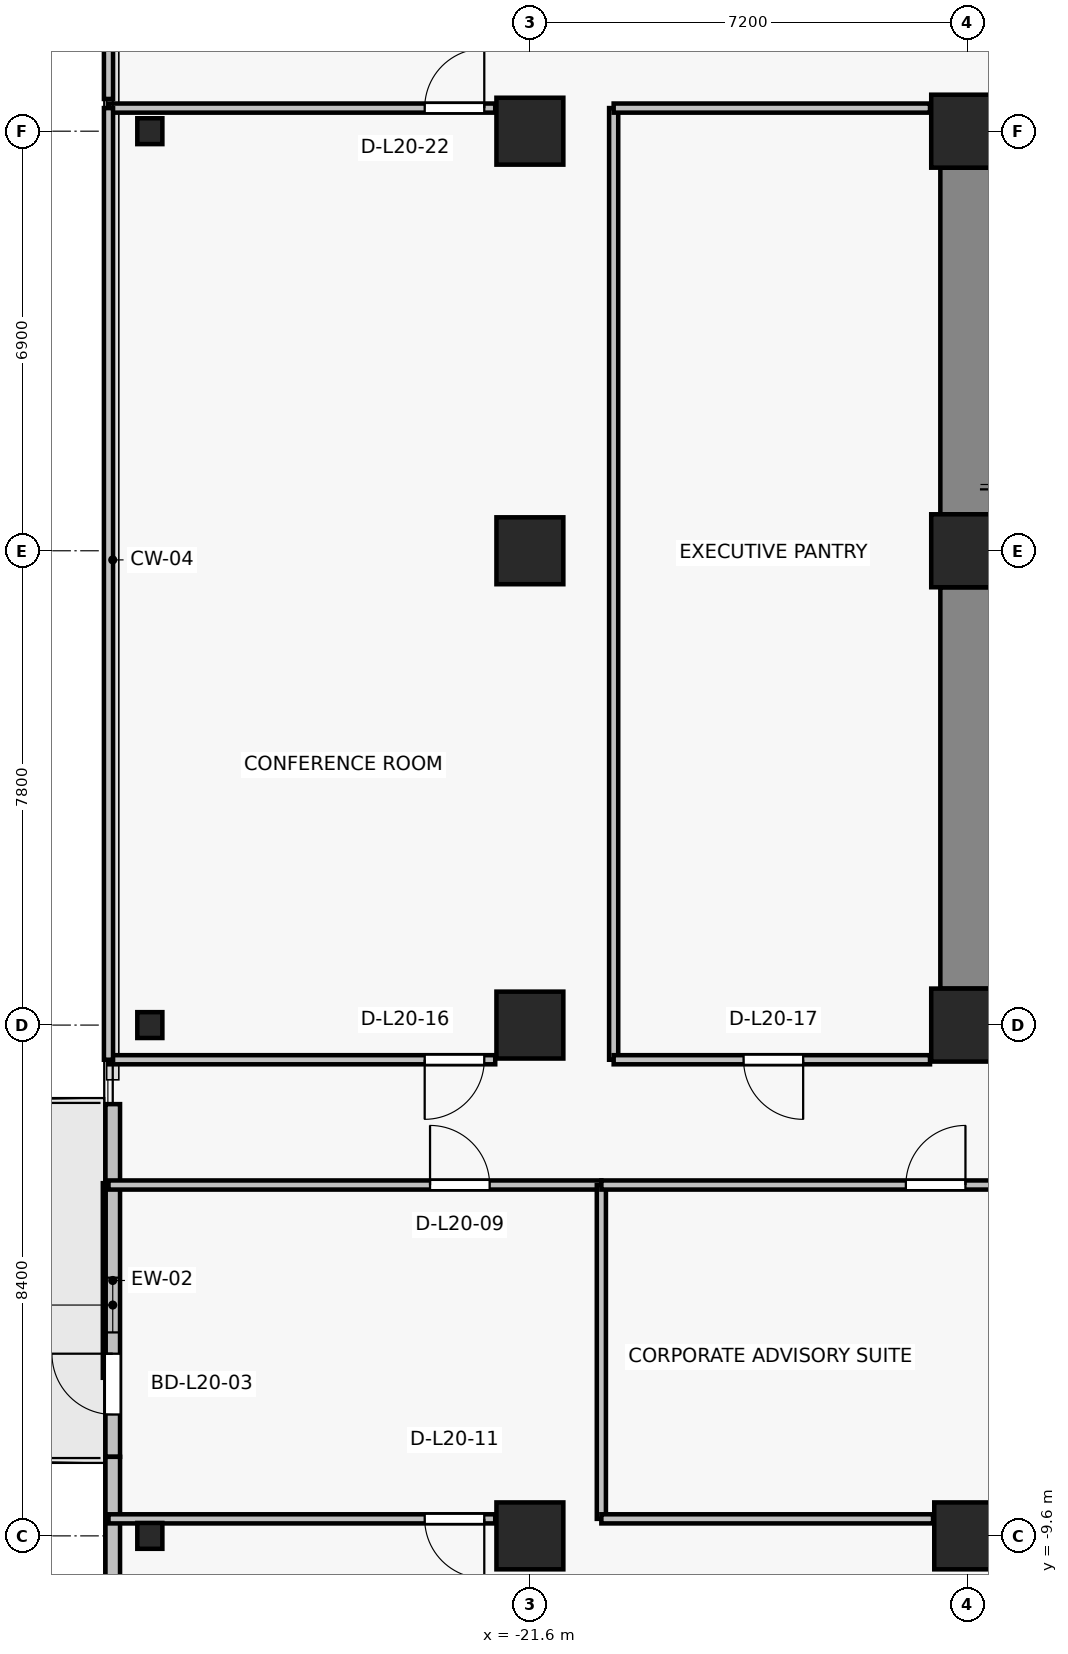
"""IFC4 building model, lengths in metres.
Left out: names, types, materials, properties, quantities, classifications, styles, units other than length and angle.
Written with IfcOpenShell. Run it as: python <this file> out.ifc"""

import sys

from ifc_helpers import new_model, si_unit, direction, frame, frame_2d, origin, origin_2d, place, context, subcontext, project, spatial, rectangle, i_section, extrude, source, transform, mapped, element, fill, save


model = new_model("IFC4")
c1 = context("Model", 3, precision=1e-05, world=origin(), true_north=direction((0.0, 1.0)))
c2 = subcontext(c1, "Body", "Model", "MODEL_VIEW")
j1 = project(units=[si_unit("LENGTHUNIT", "METRE"), si_unit("PLANEANGLEUNIT", "RADIAN")], contexts=[c1])
p1 = place(None, origin())
s1 = spatial("IfcSite", under=j1, at=p1, CompositionType="ELEMENT")
p2 = place(p1, origin())
s2 = spatial("IfcBuilding", under=s1, at=p2, CompositionType="ELEMENT")
p3 = place(p2, frame((0.0, 0.0, 73.6)))
s3 = spatial("IfcBuildingStorey", under=s2, at=p3, CompositionType="ELEMENT", Elevation=73.6)
for number, where, z_axis, x_axis in (
    (1, (-14.4, -1.2, 0.0), (0.0, 0.0, 1.0), (1.0, 0.0, 0.0)),
    (2, (-14.4, 6.6, 0.0), (0.0, 0.0, 1.0), (1.0, 0.0, 0.0)),
    (3, (-14.4, 13.5, 0.0), (0.0, 0.0, 1.0), (1.0, 0.0, 0.0)),
):
    element("IfcColumn", number, at=place(p3, frame(where, z_axis=z_axis, x_axis=x_axis)), inside=s3, PredefinedType="COLUMN", context=c2, shape_type="SweptSolid", body=[
        extrude(rectangle(XDim=1.2, YDim=1.2, at=origin_2d()), origin(), (0.0, 0.0, 1.0), 3.3),
    ])
for number, where, z_axis, x_axis in (
    (4, (-14.4, -9.6, 0.0), (0.0, 0.0, 1.0), (1.0, 0.0, 0.0)),
    (5, (-21.6, -9.6, 0.0), (0.0, 0.0, 1.0), (1.0, 0.0, 0.0)),
    (6, (-21.6, -1.2, 0.0), (0.0, 0.0, 1.0), (1.0, 0.0, 0.0)),
    (7, (-21.6, 6.6, 0.0), (0.0, 0.0, 1.0), (1.0, 0.0, 0.0)),
    (8, (-21.6, 13.5, 0.0), (0.0, 0.0, 1.0), (1.0, 0.0, 0.0)),
):
    element("IfcColumn", number, at=place(p3, frame(where, z_axis=z_axis, x_axis=x_axis)), inside=s3, PredefinedType="COLUMN", context=c2, shape_type="SweptSolid", body=[
        extrude(rectangle(XDim=1.1, YDim=1.1, at=origin_2d()), origin(), (0.0, 0.0, 1.0), 3.3),
    ])
for number, where, z_axis, x_axis in (
    (9, (-27.85, -9.6, 0.0), (0.0, 0.0, 1.0), (1.0, 0.0, 0.0)),
    (10, (-27.85, -1.2, 0.0), (0.0, 0.0, 1.0), (1.0, 0.0, 0.0)),
    (11, (-27.85, 13.5, 0.0), (0.0, 0.0, 1.0), (1.0, 0.0, 0.0)),
):
    element("IfcColumn", number, at=place(p3, frame(where, z_axis=z_axis, x_axis=x_axis)), inside=s3, PredefinedType="COLUMN", context=c2, shape_type="SweptSolid", body=[
        extrude(i_section(OverallWidth=0.412, OverallDepth=0.425, WebThickness=0.026, FlangeThickness=0.039, FilletRadius=0.015, at=origin_2d()), origin(), (0.0, 0.0, 1.0), 3.3),
    ])
p4 = place(p3, frame((-14.4, -0.6, 0.0), z_axis=(0.0, 0.0, 1.0), x_axis=(0.0, 1.0, 0.0)))
e12 = element("IfcWall", 12, at=p4, inside=s3, PredefinedType="SHEAR", context=c2, shape_type="SweptSolid", body=[
    extrude(rectangle(XDim=6.6, YDim=0.9, at=frame_2d((3.3, 0.0))), origin(), (0.0, 0.0, 1.0), 3.075),
])
p5 = place(p3, frame((-14.4, 7.2, 0.0), z_axis=(0.0, 0.0, 1.0), x_axis=(0.0, 1.0, 0.0)))
e13 = element("IfcWall", 13, at=p5, inside=s3, PredefinedType="SHEAR", context=c2, shape_type="SweptSolid", body=[
    extrude(rectangle(XDim=5.7, YDim=0.9, at=frame_2d((2.85, 0.0))), origin(), (0.0, 0.0, 1.0), 3.075),
])
p6 = place(p3, frame((-28.46, -8.3, 0.0), z_axis=(0.0, 0.0, 1.0), x_axis=(0.0, 1.0, 0.0)))
e14 = element("IfcWall", 14, at=p6, inside=s3, PredefinedType="SOLIDWALL", context=c2, shape_type="SweptSolid", body=[
    extrude(rectangle(XDim=5.8, YDim=0.24, at=frame_2d((2.9, 0.0))), origin(), (0.0, 0.0, 1.0), 3.075),
])
p7 = place(p6, frame((0.696, 0.0, 0.0)))
e15 = element("IfcOpeningElement", 15, at=p7, cuts=e14, PredefinedType="OPENING", context=c2, shape_type="SweptSolid", body=[
    extrude(rectangle(XDim=1.0, YDim=2.2, at=frame_2d((0.5, 1.1))), frame((0.0, 0.13, 0.0), z_axis=(0.0, -1.0, 0.0), x_axis=(1.0, 0.0, 0.0)), (0.0, 0.0, 1.0), 0.26),
])
p8 = place(p6, frame((2.046, 0.0, 0.85)))
e16 = element("IfcOpeningElement", 16, at=p8, cuts=e14, PredefinedType="OPENING", context=c2, shape_type="SweptSolid", body=[
    extrude(rectangle(XDim=0.9, YDim=1.35, at=frame_2d((0.45, 0.675))), frame((0.0, 0.13, 0.0), z_axis=(0.0, -1.0, 0.0), x_axis=(1.0, 0.0, 0.0)), (0.0, 0.0, 1.0), 0.26),
])
p9 = place(p3, frame((-28.46, -8.3, 0.0), z_axis=(0.0, 0.0, 1.0), x_axis=(0.0, -1.0, 0.0)))
e17 = element("IfcWall", 17, at=p9, inside=s3, PredefinedType="SOLIDWALL", context=c2, shape_type="SweptSolid", body=[
    extrude(rectangle(XDim=6.76, YDim=0.24, at=frame_2d((3.38, 0.0))), origin(), (0.0, 0.0, 1.0), 3.075),
])
p10 = place(p3, frame((-22.17, -9.32, 0.0), z_axis=(0.0, 0.0, 1.0), x_axis=(-1.0, 0.0, 0.0)))
e18 = element("IfcWall", 18, at=p10, inside=s3, PredefinedType="PARTITIONING", context=c2, shape_type="SweptSolid", body=[
    extrude(rectangle(XDim=6.36, YDim=0.15, at=frame_2d((3.18, 0.0))), origin(), (0.0, 0.0, 1.0), 2.465),
])
p11 = place(p10, frame((0.18, 0.0, 0.0)))
e19 = element("IfcOpeningElement", 19, at=p11, cuts=e18, PredefinedType="OPENING", context=c2, shape_type="SweptSolid", body=[
    extrude(rectangle(XDim=0.98, YDim=2.15, at=frame_2d((0.49, 1.075))), frame((0.0, 0.085, 0.0), z_axis=(0.0, -1.0, 0.0), x_axis=(1.0, 0.0, 0.0)), (0.0, 0.0, 1.0), 0.17),
])
p12 = place(p3, frame((-28.53, -3.83, 0.0), z_axis=(0.0, 0.0, 1.0), x_axis=(1.0, 0.0, 0.0)))
e20 = element("IfcWall", 20, at=p12, inside=s3, PredefinedType="PARTITIONING", context=c2, shape_type="SweptSolid", body=[
    extrude(rectangle(XDim=8.105, YDim=0.15, at=frame_2d((4.053, 0.0))), origin(), (0.0, 0.0, 1.0), 2.465),
])
p13 = place(p12, frame((5.288, 0.0, 0.0)))
e21 = element("IfcOpeningElement", 21, at=p13, cuts=e20, PredefinedType="OPENING", context=c2, shape_type="SweptSolid", body=[
    extrude(rectangle(XDim=0.98, YDim=2.15, at=frame_2d((0.49, 1.075))), frame((0.0, 0.085, 0.0), z_axis=(0.0, -1.0, 0.0), x_axis=(1.0, 0.0, 0.0)), (0.0, 0.0, 1.0), 0.17),
])
p14 = place(p3, frame((-20.425, -3.83, 0.0), z_axis=(0.0, 0.0, 1.0), x_axis=(0.0, -1.0, 0.0)))
e22 = element("IfcWall", 22, at=p14, inside=s3, PredefinedType="PARTITIONING", context=c2, shape_type="SweptSolid", body=[
    extrude(rectangle(XDim=5.49, YDim=0.15, at=frame_2d((2.745, 0.0))), origin(), (0.0, 0.0, 1.0), 2.465),
])
p15 = place(p3, frame((-14.97, -9.32, 0.0), z_axis=(0.0, 0.0, 1.0), x_axis=(-1.0, 0.0, 0.0)))
e23 = element("IfcWall", 23, at=p15, inside=s3, PredefinedType="PARTITIONING", context=c2, shape_type="SweptSolid", body=[
    extrude(rectangle(XDim=5.455, YDim=0.15, at=frame_2d((2.727, 0.0))), origin(), (0.0, 0.0, 1.0), 2.465),
])
p16 = place(p3, frame((-20.425, -3.83, 0.0), z_axis=(0.0, 0.0, 1.0), x_axis=(1.0, 0.0, 0.0)))
e24 = element("IfcWall", 24, at=p16, inside=s3, PredefinedType="PARTITIONING", context=c2, shape_type="SweptSolid", body=[
    extrude(rectangle(XDim=10.995, YDim=0.15, at=frame_2d((5.497, 0.0))), origin(), (0.0, 0.0, 1.0), 2.465),
])
p17 = place(p16, frame((5.008, 0.0, 0.0)))
e25 = element("IfcOpeningElement", 25, at=p17, cuts=e24, PredefinedType="OPENING", context=c2, shape_type="SweptSolid", body=[
    extrude(rectangle(XDim=0.98, YDim=2.15, at=frame_2d((0.49, 1.075))), frame((0.0, 0.085, 0.0), z_axis=(0.0, -1.0, 0.0), x_axis=(1.0, 0.0, 0.0)), (0.0, 0.0, 1.0), 0.17),
])
p18 = place(p3, frame((-22.17, -1.77, 0.0), z_axis=(0.0, 0.0, 1.0), x_axis=(-1.0, 0.0, 0.0)))
e26 = element("IfcWall", 26, at=p18, inside=s3, PredefinedType="PARTITIONING", context=c2, shape_type="SweptSolid", body=[
    extrude(rectangle(XDim=6.36, YDim=0.15, at=frame_2d((3.18, 0.0))), origin(), (0.0, 0.0, 1.0), 2.465),
])
p19 = place(p18, frame((0.18, 0.0, 0.0)))
e27 = element("IfcOpeningElement", 27, at=p19, cuts=e26, PredefinedType="OPENING", context=c2, shape_type="SweptSolid", body=[
    extrude(rectangle(XDim=0.98, YDim=2.15, at=frame_2d((0.49, 1.075))), frame((0.0, 0.085, 0.0), z_axis=(0.0, -1.0, 0.0), x_axis=(1.0, 0.0, 0.0)), (0.0, 0.0, 1.0), 0.17),
])
p20 = place(p3, frame((-28.53, 13.88, 0.0), z_axis=(0.0, 0.0, 1.0), x_axis=(1.0, 0.0, 0.0)))
e28 = element("IfcWall", 28, at=p20, inside=s3, PredefinedType="PARTITIONING", context=c2, shape_type="SweptSolid", body=[
    extrude(rectangle(XDim=6.36, YDim=0.15, at=frame_2d((3.18, 0.0))), origin(), (0.0, 0.0, 1.0), 3.075),
])
p21 = place(p20, frame((5.2, 0.0, 0.0)))
e29 = element("IfcOpeningElement", 29, at=p21, cuts=e28, PredefinedType="OPENING", context=c2, shape_type="SweptSolid", body=[
    extrude(rectangle(XDim=0.98, YDim=2.15, at=frame_2d((0.49, 1.075))), frame((0.0, 0.085, 0.0), z_axis=(0.0, -1.0, 0.0), x_axis=(1.0, 0.0, 0.0)), (0.0, 0.0, 1.0), 0.17),
])
p22 = place(p3, frame((-28.53, -1.77, 0.0), z_axis=(0.0, 0.0, 1.0), x_axis=(0.0, 1.0, 0.0)))
e30 = element("IfcWall", 30, at=p22, inside=s3, PredefinedType="PARTITIONING", context=c2, shape_type="SweptSolid", body=[
    extrude(rectangle(XDim=15.65, YDim=0.15, at=frame_2d((7.825, 0.0))), origin(), (0.0, 0.0, 1.0), 3.075),
])
p23 = place(p3, frame((-20.222, 13.88, 0.0), z_axis=(0.0, 0.0, 1.0), x_axis=(0.0, -1.0, 0.0)))
e31 = element("IfcWall", 31, at=p23, inside=s3, PredefinedType="PARTITIONING", context=c2, shape_type="SweptSolid", body=[
    extrude(rectangle(XDim=15.65, YDim=0.15, at=frame_2d((7.825, 0.0))), origin(), (0.0, 0.0, 1.0), 2.465),
])
p24 = place(p3, frame((-15.02, -1.77, 0.0), z_axis=(0.0, 0.0, 1.0), x_axis=(-1.0, 0.0, 0.0)))
e32 = element("IfcWall", 32, at=p24, inside=s3, PredefinedType="PARTITIONING", context=c2, shape_type="SweptSolid", body=[
    extrude(rectangle(XDim=5.202, YDim=0.15, at=frame_2d((2.601, 0.0))), origin(), (0.0, 0.0, 1.0), 3.075),
])
p25 = place(p24, frame((2.086, 0.0, 0.0)))
e33 = element("IfcOpeningElement", 33, at=p25, cuts=e32, PredefinedType="OPENING", context=c2, shape_type="SweptSolid", body=[
    extrude(rectangle(XDim=0.98, YDim=2.15, at=frame_2d((0.49, 1.075))), frame((0.0, 0.085, 0.0), z_axis=(0.0, -1.0, 0.0), x_axis=(1.0, 0.0, 0.0)), (0.0, 0.0, 1.0), 0.17),
])
p26 = place(p3, frame((-20.222, 13.88, 0.0), z_axis=(0.0, 0.0, 1.0), x_axis=(1.0, 0.0, 0.0)))
e34 = element("IfcWall", 34, at=p26, inside=s3, PredefinedType="PARTITIONING", context=c2, shape_type="SweptSolid", body=[
    extrude(rectangle(XDim=5.202, YDim=0.15, at=frame_2d((2.601, 0.0))), origin(), (0.0, 0.0, 1.0), 3.075),
])
p27 = place(p3, frame((-28.53, 14.03, 0.0), z_axis=(0.0, 0.0, 1.0), x_axis=(0.0, 1.0, 0.0)))
e35 = element("IfcWall", 35, at=p27, inside=s3, PredefinedType="PARTITIONING", context=c2, shape_type="SweptSolid", body=[
    extrude(rectangle(XDim=4.1, YDim=0.15, at=frame_2d((2.05, 0.0))), origin(), (0.0, 0.0, 1.0), 3.075),
])
m1 = source(origin(), c2, "Body", "SweptSolid", [
    extrude(rectangle(XDim=1.0, YDim=2.2, at=frame_2d((0.5, 1.1))), frame((0.0, 0.025, 0.0), z_axis=(0.0, -1.0, 0.0), x_axis=(1.0, 0.0, 0.0)), (0.0, 0.0, 1.0), 0.05),
])
p28 = place(p7, origin())
e36 = element("IfcDoor", 36, at=p28, inside=s3, OperationType="SINGLE_SWING_RIGHT", PredefinedType="DOOR", context=c2, shape_type="MappedRepresentation", body=[
    mapped(m1, transform((0.0, 0.0, 0.0), x_axis=(1.0, 0.0, 0.0), y_axis=(0.0, 1.0, 0.0), z_axis=(0.0, 0.0, 1.0), scale=1.0)),
])
fill(e15, e36)
m2 = source(origin(), c2, "Body", "SweptSolid", [
    extrude(rectangle(XDim=0.9, YDim=1.35, at=frame_2d((0.45, 0.675))), frame((0.0, 0.03, 0.0), z_axis=(0.0, -1.0, 0.0), x_axis=(1.0, 0.0, 0.0)), (0.0, 0.0, 1.0), 0.06),
])
p29 = place(p8, origin())
e37 = element("IfcWindow", 37, at=p29, inside=s3, PartitioningType="SINGLE_PANEL", PredefinedType="WINDOW", context=c2, shape_type="MappedRepresentation", body=[
    mapped(m2, transform((0.0, 0.0, 0.0), x_axis=(1.0, 0.0, 0.0), y_axis=(0.0, 1.0, 0.0), z_axis=(0.0, 0.0, 1.0), scale=1.0)),
])
fill(e16, e37)
m3 = source(origin(), c2, "Body", "SweptSolid", [
    extrude(rectangle(XDim=0.98, YDim=2.15, at=frame_2d((0.49, 1.075))), frame((0.0, 0.025, 0.0), z_axis=(0.0, -1.0, 0.0), x_axis=(1.0, 0.0, 0.0)), (0.0, 0.0, 1.0), 0.05),
])
p30 = place(p13, origin())
e38 = element("IfcDoor", 38, at=p30, inside=s3, OperationType="SINGLE_SWING_LEFT", PredefinedType="DOOR", context=c2, shape_type="MappedRepresentation", body=[
    mapped(m3, transform((0.0, 0.0, 0.0), x_axis=(1.0, 0.0, 0.0), y_axis=(0.0, 1.0, 0.0), z_axis=(0.0, 0.0, 1.0), scale=1.0)),
])
fill(e21, e38)
p31 = place(p17, origin())
e39 = element("IfcDoor", 39, at=p31, inside=s3, OperationType="SINGLE_SWING_RIGHT", PredefinedType="DOOR", context=c2, shape_type="MappedRepresentation", body=[
    mapped(m3, transform((0.0, 0.0, 0.0), x_axis=(1.0, 0.0, 0.0), y_axis=(0.0, 1.0, 0.0), z_axis=(0.0, 0.0, 1.0), scale=1.0)),
])
fill(e25, e39)
p32 = place(p11, origin())
e40 = element("IfcDoor", 40, at=p32, inside=s3, OperationType="SINGLE_SWING_LEFT", PredefinedType="DOOR", context=c2, shape_type="MappedRepresentation", body=[
    mapped(m3, transform((0.0, 0.0, 0.0), x_axis=(1.0, 0.0, 0.0), y_axis=(0.0, 1.0, 0.0), z_axis=(0.0, 0.0, 1.0), scale=1.0)),
])
fill(e19, e40)
p33 = place(p19, origin())
e41 = element("IfcDoor", 41, at=p33, inside=s3, OperationType="SINGLE_SWING_RIGHT", PredefinedType="DOOR", context=c2, shape_type="MappedRepresentation", body=[
    mapped(m3, transform((0.0, 0.0, 0.0), x_axis=(1.0, 0.0, 0.0), y_axis=(0.0, 1.0, 0.0), z_axis=(0.0, 0.0, 1.0), scale=1.0)),
])
fill(e27, e41)
p34 = place(p25, origin())
e42 = element("IfcDoor", 42, at=p34, inside=s3, OperationType="SINGLE_SWING_LEFT", PredefinedType="DOOR", context=c2, shape_type="MappedRepresentation", body=[
    mapped(m3, transform((0.0, 0.0, 0.0), x_axis=(1.0, 0.0, 0.0), y_axis=(0.0, 1.0, 0.0), z_axis=(0.0, 0.0, 1.0), scale=1.0)),
])
fill(e33, e42)
p35 = place(p21, origin())
e43 = element("IfcDoor", 43, at=p35, inside=s3, OperationType="SINGLE_SWING_RIGHT", PredefinedType="DOOR", context=c2, shape_type="MappedRepresentation", body=[
    mapped(m3, transform((0.0, 0.0, 0.0), x_axis=(1.0, 0.0, 0.0), y_axis=(0.0, 1.0, 0.0), z_axis=(0.0, 0.0, 1.0), scale=1.0)),
])
fill(e29, e43)
save(model, sys.argv[1])
